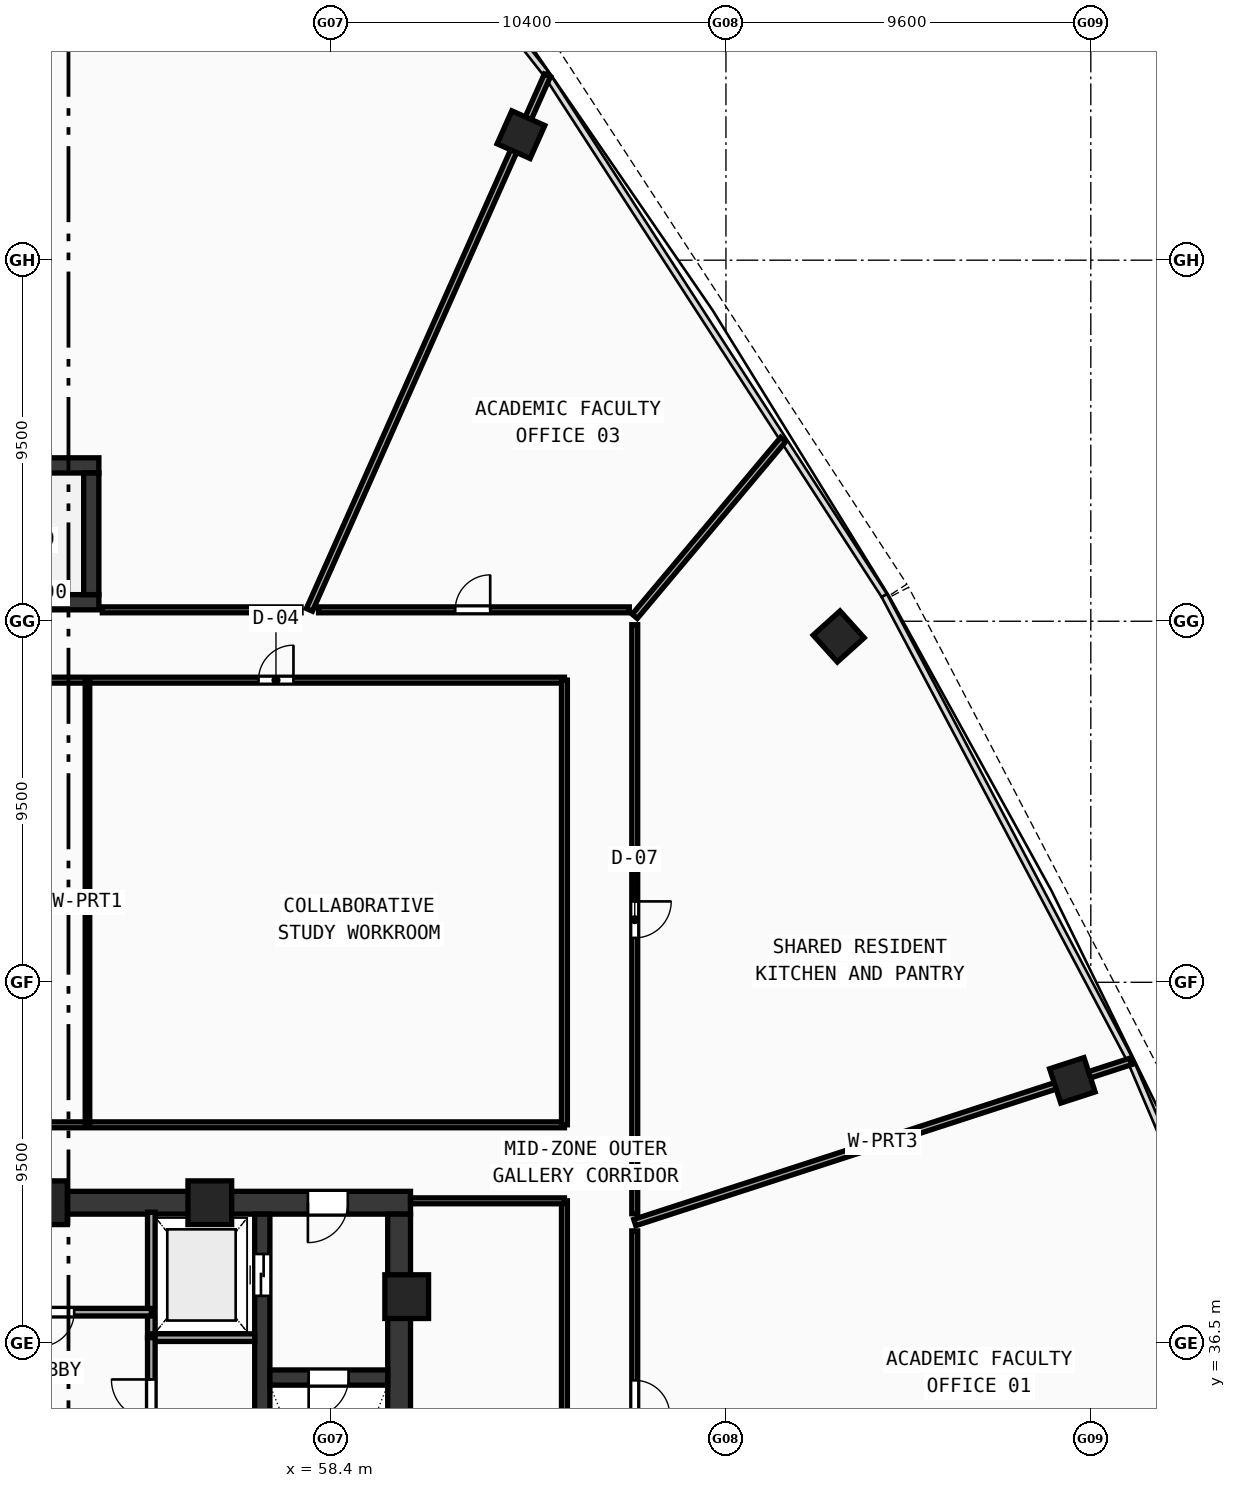
"""IFC4 building model, lengths in metres.
Left out: names, types, materials, properties, quantities, classifications, styles, units other than length and angle.
Written with IfcOpenShell. Run it as: python <this file> out.ifc"""

import sys

from ifc_helpers import new_model, si_unit, direction, frame, frame_2d, origin, origin_with_axes, origin_2d, place, context, subcontext, project, spatial, rectangle, hollow_rectangle, extrude, source, transform, mapped, element, fill, save


model = new_model("IFC4")
c1 = context("Model", 3, precision=1e-05, world=origin(), true_north=direction((0.0, 1.0)))
c2 = subcontext(c1, "Body", "Model", "MODEL_VIEW")
j1 = project(units=[si_unit("LENGTHUNIT", "METRE"), si_unit("PLANEANGLEUNIT", "RADIAN")], contexts=[c1])
p1 = place(None, origin())
s1 = spatial("IfcSite", under=j1, at=p1, CompositionType="ELEMENT")
p2 = place(p1, origin())
s2 = spatial("IfcBuilding", under=s1, at=p2, CompositionType="ELEMENT")
p3 = place(p2, frame((0.0, 0.0, 144.55)))
s3 = spatial("IfcBuildingStorey", under=s2, at=p3, CompositionType="ELEMENT", Elevation=144.55)
p4 = place(p3, frame((49.2, 40.2, 0.0), z_axis=(0.0, 0.0, 1.0), x_axis=(1.0, 0.0, 0.0)))
e1 = element("IfcWall", 1, at=p4, inside=s3, PredefinedType="SHEAR", context=c2, shape_type="SweptSolid", body=[
    extrude(rectangle(XDim=11.3, YDim=0.6, at=frame_2d((5.65, 0.0))), origin(), (0.0, 0.0, 1.0), 3.42),
])
p5 = place(p4, frame((8.6, 0.0, 0.0)))
e2 = element("IfcOpeningElement", 2, at=p5, cuts=e1, PredefinedType="OPENING", context=c2, shape_type="SweptSolid", body=[
    extrude(rectangle(XDim=1.05, YDim=2.1, at=frame_2d((0.525, 1.05))), frame((0.0, 0.31, 0.0), z_axis=(0.0, -1.0, 0.0), x_axis=(1.0, 0.0, 0.0)), (0.0, 0.0, 1.0), 0.62),
])
p6 = place(p3, frame((60.2, 27.8, 0.0), z_axis=(0.0, 0.0, 1.0), x_axis=(0.0, 1.0, 0.0)))
e3 = element("IfcWall", 3, at=p6, inside=s3, PredefinedType="SHEAR", context=c2, shape_type="SweptSolid", body=[
    extrude(rectangle(XDim=12.1, YDim=0.6, at=frame_2d((6.05, 0.0))), origin(), (0.0, 0.0, 1.0), 3.42),
])
p7 = place(p3, frame((56.6, 27.8, 0.0), z_axis=(0.0, 0.0, 1.0), x_axis=(0.0, 1.0, 0.0)))
e4 = element("IfcWall", 4, at=p7, inside=s3, PredefinedType="SHEAR", context=c2, shape_type="SweptSolid", body=[
    extrude(rectangle(XDim=12.1, YDim=0.4, at=frame_2d((6.05, 0.0))), origin(), (0.0, 0.0, 1.0), 3.42),
])
p8 = place(p7, frame((9.95, 0.0, 0.0)))
e5 = element("IfcOpeningElement", 5, at=p8, cuts=e4, PredefinedType="OPENING", context=c2, shape_type="SweptSolid", body=[
    extrude(rectangle(XDim=1.1, YDim=2.1, at=frame_2d((0.55, 1.05))), frame((0.0, 0.21, 0.0), z_axis=(0.0, -1.0, 0.0), x_axis=(1.0, 0.0, 0.0)), (0.0, 0.0, 1.0), 0.42),
])
p9 = place(p3, frame((56.8, 35.6, 0.0), z_axis=(0.0, 0.0, 1.0), x_axis=(1.0, 0.0, 0.0)))
e6 = element("IfcWall", 6, at=p9, inside=s3, PredefinedType="SHEAR", context=c2, shape_type="SweptSolid", body=[
    extrude(rectangle(XDim=3.1, YDim=0.4, at=frame_2d((1.55, 0.0))), origin(), (0.0, 0.0, 1.0), 3.42),
])
p10 = place(p9, frame((1.02, 0.0, 0.0)))
e7 = element("IfcOpeningElement", 7, at=p10, cuts=e6, PredefinedType="OPENING", context=c2, shape_type="SweptSolid", body=[
    extrude(rectangle(XDim=1.05, YDim=2.1, at=frame_2d((0.525, 1.05))), frame((0.0, 0.21, 0.0), z_axis=(0.0, -1.0, 0.0), x_axis=(1.0, 0.0, 0.0)), (0.0, 0.0, 1.0), 0.42),
])
p11 = place(p3, frame((43.8, 59.6, 0.0), z_axis=(0.0, 0.0, 1.0), x_axis=(1.0, 0.0, 0.0)))
e8 = element("IfcWall", 8, at=p11, inside=s3, PredefinedType="SHEAR", context=c2, shape_type="SweptSolid", body=[
    extrude(rectangle(XDim=8.5, YDim=0.4, at=frame_2d((4.25, 0.0))), origin(), (0.0, 0.0, 1.0), 3.42),
])
p12 = place(p3, frame((43.8, 56.0, 0.0), z_axis=(0.0, 0.0, 1.0), x_axis=(1.0, 0.0, 0.0)))
e9 = element("IfcWall", 9, at=p12, inside=s3, PredefinedType="SHEAR", context=c2, shape_type="SweptSolid", body=[
    extrude(rectangle(XDim=8.5, YDim=0.4, at=frame_2d((4.25, 0.0))), origin(), (0.0, 0.0, 1.0), 3.42),
])
p13 = place(p12, frame((0.62, 0.0, 0.0)))
e10 = element("IfcOpeningElement", 10, at=p13, cuts=e9, PredefinedType="OPENING", context=c2, shape_type="SweptSolid", body=[
    extrude(rectangle(XDim=1.05, YDim=2.1, at=frame_2d((0.525, 1.05))), frame((0.0, 0.21, 0.0), z_axis=(0.0, -1.0, 0.0), x_axis=(1.0, 0.0, 0.0)), (0.0, 0.0, 1.0), 0.42),
])
p14 = place(p3, frame((52.1, 56.2, 0.0), z_axis=(0.0, 0.0, 1.0), x_axis=(0.0, 1.0, 0.0)))
e11 = element("IfcWall", 11, at=p14, inside=s3, PredefinedType="SHEAR", context=c2, shape_type="SweptSolid", body=[
    extrude(rectangle(XDim=3.2, YDim=0.4, at=frame_2d((1.6, 0.0))), origin(), (0.0, 0.0, 1.0), 3.42),
])
m1 = source(origin(), c2, "Body", "SweptSolid", [
    extrude(hollow_rectangle(XDim=1.15, YDim=1.15, WallThickness=0.048, at=origin_2d()), origin(), (0.0, 0.0, 1.0), 3.68),
])
for number, where, z_axis, x_axis in (
    (12, (60.4, 37.729, -0.26), (0.0, 0.0, 1.0), (1.0, 0.0, 0.0)),
    (13, (55.219, 40.2, -0.26), (0.0, 0.0, 1.0), (1.0, 0.0, 0.0)),
    (14, (50.894, 40.2, -0.26), (0.0, 0.0, 1.0), (1.0, 0.0, 0.0)),
):
    element("IfcColumn", number, at=place(p3, frame(where, z_axis=z_axis, x_axis=x_axis)), inside=s3, PredefinedType="COLUMN", context=c2, shape_type="MappedRepresentation", body=[
        mapped(m1, transform((0.0, 0.0, 0.0), scale=1.0)),
    ])
m2 = source(origin(), c2, "Body", "SweptSolid", [
    extrude(hollow_rectangle(XDim=0.95, YDim=0.95, WallThickness=0.04, at=origin_2d()), origin(), (0.0, 0.0, 1.0), 3.68),
])
for number, where, z_axis, x_axis in (
    (15, (77.915, 43.42, -0.26), (0.0, 0.0, 1.0), (-0.309, 0.951, 0.0)),
    (16, (71.766, 55.099, -0.26), (0.0, 0.0, 1.0), (-0.669, 0.743, 0.0)),
    (17, (63.406, 68.303, -0.26), (0.0, 0.0, 1.0), (-0.914, 0.407, 0.0)),
):
    element("IfcColumn", number, at=place(p3, frame(where, z_axis=z_axis, x_axis=x_axis)), inside=s3, PredefinedType="COLUMN", context=c2, shape_type="MappedRepresentation", body=[
        mapped(m2, transform((0.0, 0.0, 0.0), scale=1.0)),
    ])
p15 = place(p3, frame((53.68, 36.65, 0.0), z_axis=(0.0, 0.0, 1.0), x_axis=(0.0, 1.0, 0.0)))
e18 = element("IfcWall", 18, at=p15, inside=s3, PredefinedType="SOLIDWALL", context=c2, shape_type="SweptSolid", body=[
    extrude(rectangle(XDim=3.3, YDim=0.2, at=frame_2d((1.65, 0.0))), origin(), (0.0, 0.0, 1.0), 3.42),
])
p16 = place(p3, frame((53.68, 36.65, 0.0), z_axis=(0.0, 0.0, 1.0), x_axis=(1.0, 0.0, 0.0)))
e19 = element("IfcWall", 19, at=p16, inside=s3, PredefinedType="SOLIDWALL", context=c2, shape_type="SweptSolid", body=[
    extrude(rectangle(XDim=2.72, YDim=0.2, at=frame_2d((1.36, 0.0))), origin(), (0.0, 0.0, 1.0), 3.42),
])
p17 = place(p3, frame((48.95, 37.32, 0.0), z_axis=(0.0, 0.0, 1.0), x_axis=(1.0, 0.0, 0.0)))
e20 = element("IfcWall", 20, at=p17, inside=s3, PredefinedType="SOLIDWALL", context=c2, shape_type="SweptSolid", body=[
    extrude(rectangle(XDim=4.73, YDim=0.2, at=frame_2d((2.365, 0.0))), origin(), (0.0, 0.0, 1.0), 3.42),
])
p18 = place(p17, frame((1.8, 0.0, 0.0)))
e21 = element("IfcOpeningElement", 21, at=p18, cuts=e20, PredefinedType="OPENING", context=c2, shape_type="SweptSolid", body=[
    extrude(rectangle(XDim=0.9, YDim=2.1, at=frame_2d((0.45, 1.05))), frame((0.0, 0.11, 0.0), z_axis=(0.0, -1.0, 0.0), x_axis=(1.0, 0.0, 0.0)), (0.0, 0.0, 1.0), 0.22),
])
p19 = place(p3, frame((53.68, 27.6, 0.0), z_axis=(0.0, 0.0, 1.0), x_axis=(0.0, 1.0, 0.0)))
e22 = element("IfcWall", 22, at=p19, inside=s3, PredefinedType="SOLIDWALL", context=c2, shape_type="SweptSolid", body=[
    extrude(rectangle(XDim=9.05, YDim=0.2, at=frame_2d((4.525, 0.0))), origin(), (0.0, 0.0, 1.0), 3.42),
])
p20 = place(p19, frame((6.9, 0.0, 0.0)))
e23 = element("IfcOpeningElement", 23, at=p20, cuts=e22, PredefinedType="OPENING", context=c2, shape_type="SweptSolid", body=[
    extrude(rectangle(XDim=1.05, YDim=2.1, at=frame_2d((0.525, 1.05))), frame((0.0, 0.11, 0.0), z_axis=(0.0, -1.0, 0.0), x_axis=(1.0, 0.0, 0.0)), (0.0, 0.0, 1.0), 0.22),
])
p21 = place(p3, frame((31.45, 42.25, 0.0), z_axis=(0.0, 0.0, 1.0), x_axis=(1.0, 0.0, 0.0)))
e24 = element("IfcWall", 24, at=p21, inside=s3, PredefinedType="PARTITIONING", context=c2, shape_type="SweptSolid", body=[
    extrude(rectangle(XDim=33.1, YDim=0.155, at=frame_2d((16.55, 0.0))), origin(), (0.0, 0.0, 1.0), 2.77),
])
p22 = place(p3, frame((31.45, 53.95, 0.0), z_axis=(0.0, 0.0, 1.0), x_axis=(1.0, 0.0, 0.0)))
e25 = element("IfcWall", 25, at=p22, inside=s3, PredefinedType="PARTITIONING", context=c2, shape_type="SweptSolid", body=[
    extrude(rectangle(XDim=33.1, YDim=0.155, at=frame_2d((16.55, 0.0))), origin(), (0.0, 0.0, 1.0), 2.77),
])
p23 = place(p22, frame((8.0, 0.0, 0.0)))
e26 = element("IfcOpeningElement", 26, at=p23, cuts=e25, PredefinedType="OPENING", context=c2, shape_type="SweptSolid", body=[
    extrude(rectangle(XDim=0.92, YDim=2.1, at=frame_2d((0.46, 1.05))), frame((0.0, 0.087, 0.0), z_axis=(0.0, -1.0, 0.0), x_axis=(1.0, 0.0, 0.0)), (0.0, 0.0, 1.0), 0.175),
])
p24 = place(p22, frame((25.05, 0.0, 0.0)))
e27 = element("IfcOpeningElement", 27, at=p24, cuts=e25, PredefinedType="OPENING", context=c2, shape_type="SweptSolid", body=[
    extrude(rectangle(XDim=0.92, YDim=2.1, at=frame_2d((0.46, 1.05))), frame((0.0, 0.087, 0.0), z_axis=(0.0, -1.0, 0.0), x_axis=(1.0, 0.0, 0.0)), (0.0, 0.0, 1.0), 0.175),
])
p25 = place(p3, frame((64.55, 42.25, 0.0), z_axis=(0.0, 0.0, 1.0), x_axis=(0.0, 1.0, 0.0)))
e28 = element("IfcWall", 28, at=p25, inside=s3, PredefinedType="PARTITIONING", context=c2, shape_type="SweptSolid", body=[
    extrude(rectangle(XDim=11.7, YDim=0.155, at=frame_2d((5.85, 0.0))), origin(), (0.0, 0.0, 1.0), 2.77),
])
p26 = place(p3, frame((52.0, 42.25, 0.0), z_axis=(0.0, 0.0, 1.0), x_axis=(0.0, 1.0, 0.0)))
e29 = element("IfcWall", 29, at=p26, inside=s3, PredefinedType="PARTITIONING", context=c2, shape_type="SweptSolid", body=[
    extrude(rectangle(XDim=11.7, YDim=0.12, at=frame_2d((5.85, 0.0))), origin(), (0.0, 0.0, 1.0), 2.77),
])
p27 = place(p3, frame((64.55, 23.65, 0.0), z_axis=(0.0, 0.0, 1.0), x_axis=(0.0, 1.0, 0.0)))
e30 = element("IfcWall", 30, at=p27, inside=s3, PredefinedType="PARTITIONING", context=c2, shape_type="SweptSolid", body=[
    extrude(rectangle(XDim=16.6, YDim=0.155, at=frame_2d((8.3, 0.0))), origin(), (0.0, 0.0, 1.0), 2.77),
])
p28 = place(p27, frame((7.5, 0.0, 0.0)))
e31 = element("IfcOpeningElement", 31, at=p28, cuts=e30, PredefinedType="OPENING", context=c2, shape_type="SweptSolid", body=[
    extrude(rectangle(XDim=0.9, YDim=2.08, at=frame_2d((0.45, 1.04))), frame((0.0, 0.087, 0.0), z_axis=(0.0, -1.0, 0.0), x_axis=(1.0, 0.0, 0.0)), (0.0, 0.0, 1.0), 0.175),
])
p29 = place(p3, frame((60.5, 40.25, 0.0), z_axis=(0.0, 0.0, 1.0), x_axis=(1.0, 0.0, 0.0)))
e32 = element("IfcWall", 32, at=p29, inside=s3, PredefinedType="PARTITIONING", context=c2, shape_type="SweptSolid", body=[
    extrude(rectangle(XDim=4.05, YDim=0.155, at=frame_2d((2.025, 0.0))), origin(), (0.0, 0.0, 1.0), 3.42),
])
p30 = place(p3, frame((66.4, 39.678, 0.0), z_axis=(0.0, 0.0, 1.0), x_axis=(0.951057598357, 0.309013664112, 0.0)))
e33 = element("IfcWall", 33, at=p30, inside=s3, PredefinedType="PARTITIONING", context=c2, shape_type="SweptSolid", body=[
    extrude(rectangle(XDim=13.723, YDim=0.175, at=frame_2d((6.862, 0.0))), origin(), (0.0, 0.0, 1.0), 2.77),
])
p31 = place(p3, frame((66.4, 55.628, 0.0), z_axis=(0.0, 0.0, 1.0), x_axis=(0.642804736834, 0.766030071409, 0.0)))
e34 = element("IfcWall", 34, at=p31, inside=s3, PredefinedType="PARTITIONING", context=c2, shape_type="SweptSolid", body=[
    extrude(rectangle(XDim=6.076, YDim=0.175, at=frame_2d((3.038, 0.0))), origin(), (0.0, 0.0, 1.0), 2.77),
])
p32 = place(p3, frame((57.84, 55.8, 0.0), z_axis=(0.0, 0.0, 1.0), x_axis=(0.406735812773, 0.913545827317, 0.0)))
e35 = element("IfcWall", 35, at=p32, inside=s3, PredefinedType="PARTITIONING", context=c2, shape_type="SweptSolid", body=[
    extrude(rectangle(XDim=15.394, YDim=0.175, at=frame_2d((7.697, 0.0))), origin(), (0.0, 0.0, 1.0), 2.77),
])
p33 = place(p3, frame((52.391, 55.8, 0.0), z_axis=(0.0, 0.0, 1.0), x_axis=(1.0, 0.0, 0.0)))
e36 = element("IfcWall", 36, at=p33, inside=s3, PredefinedType="PARTITIONING", context=c2, shape_type="SweptSolid", body=[
    extrude(rectangle(XDim=5.229, YDim=0.155, at=frame_2d((2.614, 0.0))), origin(), (0.0, 0.0, 1.0), 2.77),
])
p34 = place(p3, frame((58.08, 55.8, 0.0), z_axis=(0.0, 0.0, 1.0), x_axis=(1.0, 0.0, 0.0)))
e37 = element("IfcWall", 37, at=p34, inside=s3, PredefinedType="PARTITIONING", context=c2, shape_type="SweptSolid", body=[
    extrude(rectangle(XDim=8.177, YDim=0.155, at=frame_2d((4.088, 0.0))), origin(), (0.0, 0.0, 1.0), 3.02),
])
p35 = place(p34, frame((3.596, 0.0, 0.0)))
e38 = element("IfcOpeningElement", 38, at=p35, cuts=e37, PredefinedType="OPENING", context=c2, shape_type="SweptSolid", body=[
    extrude(rectangle(XDim=0.92, YDim=2.1, at=frame_2d((0.46, 1.05))), frame((0.0, 0.087, 0.0), z_axis=(0.0, -1.0, 0.0), x_axis=(1.0, 0.0, 0.0)), (0.0, 0.0, 1.0), 0.175),
])
p36 = place(p3, frame((66.4, 55.408, 0.0), z_axis=(0.0, 0.0, 1.0), x_axis=(0.0, -1.0, 0.0)))
e39 = element("IfcWall", 39, at=p36, inside=s3, PredefinedType="PARTITIONING", context=c2, shape_type="SweptSolid", body=[
    extrude(rectangle(XDim=15.499, YDim=0.155, at=frame_2d((7.749, 0.0))), origin(), (0.0, 0.0, 1.0), 2.77),
])
p37 = place(p36, frame((7.28, 0.0, 0.0)))
e40 = element("IfcOpeningElement", 40, at=p37, cuts=e39, PredefinedType="OPENING", context=c2, shape_type="SweptSolid", body=[
    extrude(rectangle(XDim=0.96, YDim=2.12, at=frame_2d((0.48, 1.06))), frame((0.0, 0.087, 0.0), z_axis=(0.0, -1.0, 0.0), x_axis=(1.0, 0.0, 0.0)), (0.0, 0.0, 1.0), 0.175),
])
p38 = place(p3, frame((66.4, 39.459, 0.0), z_axis=(0.0, 0.0, 1.0), x_axis=(0.0, -1.0, 0.0)))
e41 = element("IfcWall", 41, at=p38, inside=s3, PredefinedType="PARTITIONING", context=c2, shape_type="SweptSolid", body=[
    extrude(rectangle(XDim=8.783, YDim=0.155, at=frame_2d((4.392, 0.0))), origin(), (0.0, 0.0, 1.0), 3.42),
])
p39 = place(p38, frame((3.932, 0.0, 0.0)))
e42 = element("IfcOpeningElement", 42, at=p39, cuts=e41, PredefinedType="OPENING", context=c2, shape_type="SweptSolid", body=[
    extrude(rectangle(XDim=0.92, YDim=2.1, at=frame_2d((0.46, 1.05))), frame((0.0, 0.087, 0.0), z_axis=(0.0, -1.0, 0.0), x_axis=(1.0, 0.0, 0.0)), (0.0, 0.0, 1.0), 0.175),
])
m3 = source(origin(), c2, "Body", "SweptSolid", [
    extrude(rectangle(XDim=1.05, YDim=2.1, at=frame_2d((0.525, 1.05))), frame((0.0, 0.025, 0.0), z_axis=(0.0, -1.0, 0.0), x_axis=(1.0, 0.0, 0.0)), (0.0, 0.0, 1.0), 0.05),
])
p40 = place(p10, frame((1.05, 0.0, 0.0), z_axis=(0.0, 0.0, 1.0), x_axis=(-1.0, 0.0, 0.0)))
e43 = element("IfcDoor", 43, at=p40, inside=s3, OperationType="SINGLE_SWING_RIGHT", PredefinedType="DOOR", context=c2, shape_type="MappedRepresentation", body=[
    mapped(m3, transform((0.0, 0.0, 0.0), scale=1.0)),
])
fill(e7, e43)
p41 = place(p5, frame((1.05, 0.0, 0.0), z_axis=(0.0, 0.0, 1.0), x_axis=(-1.0, 0.0, 0.0)))
e44 = element("IfcDoor", 44, at=p41, inside=s3, OperationType="SINGLE_SWING_RIGHT", PredefinedType="DOOR", context=c2, shape_type="MappedRepresentation", body=[
    mapped(m3, transform((0.0, 0.0, 0.0), scale=1.0)),
])
fill(e2, e44)
m4 = source(origin(), c2, "Body", "SweptSolid", [
    extrude(rectangle(XDim=1.1, YDim=2.1, at=frame_2d((0.55, 1.05))), frame((0.0, 0.025, 0.0), z_axis=(0.0, -1.0, 0.0), x_axis=(1.0, 0.0, 0.0)), (0.0, 0.0, 1.0), 0.05),
])
p42 = place(p8, origin_with_axes())
e45 = element("IfcDoor", 45, at=p42, inside=s3, OperationType="DOUBLE_DOOR_SLIDING", PredefinedType="DOOR", context=c2, shape_type="MappedRepresentation", body=[
    mapped(m4, transform((0.0, 0.0, 0.0), scale=1.0)),
])
fill(e5, e45)
m5 = source(origin(), c2, "Body", "SweptSolid", [
    extrude(rectangle(XDim=0.9, YDim=2.1, at=frame_2d((0.45, 1.05))), frame((0.0, 0.025, 0.0), z_axis=(0.0, -1.0, 0.0), x_axis=(1.0, 0.0, 0.0)), (0.0, 0.0, 1.0), 0.05),
])
p43 = place(p18, frame((0.9, 0.0, 0.0), z_axis=(0.0, 0.0, 1.0), x_axis=(-1.0, 0.0, 0.0)))
e46 = element("IfcDoor", 46, at=p43, inside=s3, OperationType="SINGLE_SWING_RIGHT", PredefinedType="DOOR", context=c2, shape_type="MappedRepresentation", body=[
    mapped(m5, transform((0.0, 0.0, 0.0), scale=1.0)),
])
fill(e21, e46)
p44 = place(p20, origin_with_axes())
e47 = element("IfcDoor", 47, at=p44, inside=s3, OperationType="SINGLE_SWING_RIGHT", PredefinedType="DOOR", context=c2, shape_type="MappedRepresentation", body=[
    mapped(m3, transform((0.0, 0.0, 0.0), scale=1.0)),
])
fill(e23, e47)
m6 = source(origin(), c2, "Body", "SweptSolid", [
    extrude(rectangle(XDim=0.92, YDim=2.1, at=frame_2d((0.46, 1.05))), frame((0.0, 0.025, 0.0), z_axis=(0.0, -1.0, 0.0), x_axis=(1.0, 0.0, 0.0)), (0.0, 0.0, 1.0), 0.05),
])
p45 = place(p24, origin_with_axes())
e48 = element("IfcDoor", 48, at=p45, inside=s3, OperationType="SINGLE_SWING_RIGHT", PredefinedType="DOOR", context=c2, shape_type="MappedRepresentation", body=[
    mapped(m6, transform((0.0, 0.0, 0.0), scale=1.0)),
])
fill(e27, e48)
p46 = place(p39, origin_with_axes())
e49 = element("IfcDoor", 49, at=p46, inside=s3, OperationType="SINGLE_SWING_RIGHT", PredefinedType="DOOR", context=c2, shape_type="MappedRepresentation", body=[
    mapped(m6, transform((0.0, 0.0, 0.0), scale=1.0)),
])
fill(e42, e49)
m7 = source(origin(), c2, "Body", "SweptSolid", [
    extrude(rectangle(XDim=0.96, YDim=2.12, at=frame_2d((0.48, 1.06))), frame((0.0, 0.025, 0.0), z_axis=(0.0, -1.0, 0.0), x_axis=(1.0, 0.0, 0.0)), (0.0, 0.0, 1.0), 0.05),
])
p47 = place(p37, origin_with_axes())
e50 = element("IfcDoor", 50, at=p47, inside=s3, OperationType="SINGLE_SWING_LEFT", PredefinedType="DOOR", context=c2, shape_type="MappedRepresentation", body=[
    mapped(m7, transform((0.0, 0.0, 0.0), scale=1.0)),
])
fill(e40, e50)
p48 = place(p35, origin_with_axes())
e51 = element("IfcDoor", 51, at=p48, inside=s3, OperationType="SINGLE_SWING_RIGHT", PredefinedType="DOOR", context=c2, shape_type="MappedRepresentation", body=[
    mapped(m6, transform((0.0, 0.0, 0.0), scale=1.0)),
])
fill(e38, e51)
save(model, sys.argv[1])
